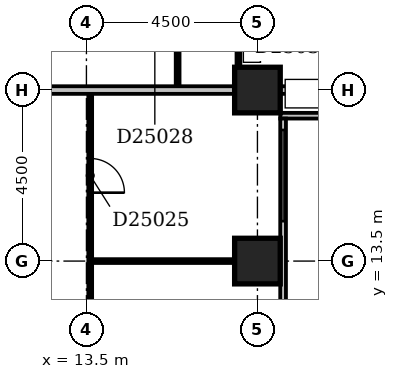
"""IFC4 building model, lengths in metres.
Left out: names, types, materials, properties, quantities, classifications, styles, units other than length and angle.
Written with IfcOpenShell. Run it as: python <this file> out.ifc"""

import sys

from ifc_helpers import new_model, si_unit, direction, frame, frame_2d, origin, origin_2d, place, context, subcontext, project, spatial, rectangle, extrude, element, fill, save


model = new_model("IFC4")
c1 = context("Model", 3, precision=1e-05, world=origin(), true_north=direction((0.0, 1.0)))
c2 = subcontext(c1, "Body", "Model", "MODEL_VIEW")
j1 = project(units=[si_unit("LENGTHUNIT", "METRE"), si_unit("PLANEANGLEUNIT", "RADIAN")], contexts=[c1])
p1 = place(None, origin())
s1 = spatial("IfcSite", under=j1, at=p1, CompositionType="ELEMENT")
p2 = place(p1, origin())
s2 = spatial("IfcBuilding", under=s1, at=p2, CompositionType="ELEMENT")
p3 = place(p2, frame((0.0, 0.0, 101.0)))
s3 = spatial("IfcBuildingStorey", under=s2, at=p3, CompositionType="ELEMENT", Elevation=101.0)
for number, where, z_axis, x_axis in (
    (1, (18.0, 13.5, -0.3), (0.0, 0.0, 1.0), (1.0, 0.0, 0.0)),
    (2, (18.0, 18.0, -0.3), (0.0, 0.0, 1.0), (1.0, 0.0, 0.0)),
):
    element("IfcColumn", number, at=place(p3, frame(where, z_axis=z_axis, x_axis=x_axis)), inside=s3, PredefinedType="COLUMN", context=c2, shape_type="SweptSolid", body=[
        extrude(rectangle(XDim=1.2, YDim=1.2, at=origin_2d()), origin(), (0.0, 0.0, 1.0), 3.6),
    ])
p4 = place(p3, frame((18.675, 8.4, 0.0), z_axis=(0.0, 0.0, 1.0), x_axis=(0.0, 1.0, 0.0)))
e3 = element("IfcWall", 3, at=p4, inside=s3, PredefinedType="STANDARD", context=c2, shape_type="SweptSolid", body=[
    extrude(rectangle(XDim=8.85, YDim=0.15, at=frame_2d((4.425, 0.0))), origin(), (0.0, 0.0, 1.0), 2.7),
])
p5 = place(p4, frame((1.535, 0.0, 0.6)))
e4 = element("IfcOpeningElement", 4, at=p5, cuts=e3, PredefinedType="OPENING", context=c2, shape_type="SweptSolid", body=[
    extrude(rectangle(XDim=1.2, YDim=1.8, at=frame_2d((0.6, 0.9))), frame((0.0, 0.087, 0.0), z_axis=(0.0, -1.0, 0.0), x_axis=(1.0, 0.0, 0.0)), (0.0, 0.0, 1.0), 0.174),
])
p6 = place(p4, frame((6.15, 0.0, 0.6)))
e5 = element("IfcOpeningElement", 5, at=p6, cuts=e3, PredefinedType="OPENING", context=c2, shape_type="SweptSolid", body=[
    extrude(rectangle(XDim=2.4, YDim=1.8, at=frame_2d((1.2, 0.9))), frame((0.0, 0.087, 0.0), z_axis=(0.0, -1.0, 0.0), x_axis=(1.0, 0.0, 0.0)), (0.0, 0.0, 1.0), 0.174),
])
p7 = place(p3, frame((18.6, 17.325, 0.0), z_axis=(0.0, 0.0, 1.0), x_axis=(1.0, 0.0, 0.0)))
e6 = element("IfcWall", 6, at=p7, inside=s3, PredefinedType="STANDARD", context=c2, shape_type="SweptSolid", body=[
    extrude(rectangle(XDim=4.65, YDim=0.15, at=frame_2d((2.325, 0.0))), origin(), (0.0, 0.0, 1.0), 2.7),
])
p8 = place(p3, frame((13.6, 9.6, 0.0), z_axis=(0.0, 0.0, 1.0), x_axis=(0.0, 1.0, 0.0)))
e7 = element("IfcWall", 7, at=p8, inside=s3, PredefinedType="PARTITIONING", context=c2, shape_type="SweptSolid", body=[
    extrude(rectangle(XDim=8.3, YDim=0.1, at=frame_2d((4.15, 0.0))), origin(), (0.0, 0.0, 1.0), 3.3),
])
p9 = place(p8, frame((1.2, 0.0, 0.0)))
e8 = element("IfcOpeningElement", 8, at=p9, cuts=e7, PredefinedType="OPENING", context=c2, shape_type="SweptSolid", body=[
    extrude(rectangle(XDim=0.9, YDim=2.1, at=frame_2d((0.45, 1.05))), frame((0.0, 0.062, 0.0), z_axis=(0.0, -1.0, 0.0), x_axis=(1.0, 0.0, 0.0)), (0.0, 0.0, 1.0), 0.124),
])
p10 = place(p8, frame((5.7, 0.0, 0.0)))
e9 = element("IfcOpeningElement", 9, at=p10, cuts=e7, PredefinedType="OPENING", context=c2, shape_type="SweptSolid", body=[
    extrude(rectangle(XDim=0.9, YDim=2.1, at=frame_2d((0.45, 1.05))), frame((0.0, 0.062, 0.0), z_axis=(0.0, -1.0, 0.0), x_axis=(1.0, 0.0, 0.0)), (0.0, 0.0, 1.0), 0.124),
])
p11 = place(p3, frame((13.65, 13.5, 0.0), z_axis=(0.0, 0.0, 1.0), x_axis=(1.0, 0.0, 0.0)))
e10 = element("IfcWall", 10, at=p11, inside=s3, PredefinedType="PARTITIONING", context=c2, shape_type="SweptSolid", body=[
    extrude(rectangle(XDim=3.75, YDim=0.1, at=frame_2d((1.875, 0.0))), origin(), (0.0, 0.0, 1.0), 3.3),
])
p12 = place(p3, frame((9.1, 18.0, 0.0), z_axis=(0.0, 0.0, 1.0), x_axis=(1.0, 0.0, 0.0)))
e11 = element("IfcWall", 11, at=p12, inside=s3, PredefinedType="PARTITIONING", context=c2, shape_type="SweptSolid", body=[
    extrude(rectangle(XDim=8.3, YDim=0.2, at=frame_2d((4.15, 0.0))), origin(), (0.0, 0.0, 1.0), 2.6),
])
p13 = place(p3, frame((18.6, 18.0, 0.0), z_axis=(0.0, 0.0, 1.0), x_axis=(1.0, 0.0, 0.0)))
e12 = element("IfcWall", 12, at=p13, inside=s3, PredefinedType="PARTITIONING", context=c2, shape_type="SweptSolid", body=[
    extrude(rectangle(XDim=3.3, YDim=0.2, at=frame_2d((1.65, 0.0))), origin(), (0.0, 0.0, 1.0), 2.7),
])
p14 = place(p3, frame((15.9, 18.1, 0.0), z_axis=(0.0, 0.0, 1.0), x_axis=(0.0, 1.0, 0.0)))
e13 = element("IfcWall", 13, at=p14, inside=s3, PredefinedType="PARTITIONING", context=c2, shape_type="SweptSolid", body=[
    extrude(rectangle(XDim=5.0, YDim=0.1, at=frame_2d((2.5, 0.0))), origin(), (0.0, 0.0, 1.0), 3.3),
])
p15 = place(p14, frame((2.0, 0.0, 0.0)))
e14 = element("IfcOpeningElement", 14, at=p15, cuts=e13, PredefinedType="OPENING", context=c2, shape_type="SweptSolid", body=[
    extrude(rectangle(XDim=0.9, YDim=2.1, at=frame_2d((0.45, 1.05))), frame((0.0, 0.062, 0.0), z_axis=(0.0, -1.0, 0.0), x_axis=(1.0, 0.0, 0.0)), (0.0, 0.0, 1.0), 0.124),
])
p16 = place(p3, frame((17.5, 18.1, 0.0), z_axis=(0.0, 0.0, 1.0), x_axis=(0.0, 1.0, 0.0)))
e15 = element("IfcWall", 15, at=p16, inside=s3, PredefinedType="PARTITIONING", context=c2, shape_type="SweptSolid", body=[
    extrude(rectangle(XDim=17.8, YDim=0.1, at=frame_2d((8.9, 0.0))), origin(), (0.0, 0.0, 1.0), 3.3),
])
p17 = place(p16, frame((2.85, 0.0, 0.0)))
e16 = element("IfcOpeningElement", 16, at=p17, cuts=e15, PredefinedType="OPENING", context=c2, shape_type="SweptSolid", body=[
    extrude(rectangle(XDim=0.9, YDim=2.1, at=frame_2d((0.45, 1.05))), frame((0.0, 0.062, 0.0), z_axis=(0.0, -1.0, 0.0), x_axis=(1.0, 0.0, 0.0)), (0.0, 0.0, 1.0), 0.124),
])
p18 = place(p16, frame((8.4, 0.0, 0.0)))
e17 = element("IfcOpeningElement", 17, at=p18, cuts=e15, PredefinedType="OPENING", context=c2, shape_type="SweptSolid", body=[
    extrude(rectangle(XDim=0.9, YDim=2.1, at=frame_2d((0.45, 1.05))), frame((0.0, 0.062, 0.0), z_axis=(0.0, -1.0, 0.0), x_axis=(1.0, 0.0, 0.0)), (0.0, 0.0, 1.0), 0.124),
])
p19 = place(p16, frame((14.05, 0.0, 0.0)))
e18 = element("IfcOpeningElement", 18, at=p19, cuts=e15, PredefinedType="OPENING", context=c2, shape_type="SweptSolid", body=[
    extrude(rectangle(XDim=0.9, YDim=2.1, at=frame_2d((0.45, 1.05))), frame((0.0, 0.062, 0.0), z_axis=(0.0, -1.0, 0.0), x_axis=(1.0, 0.0, 0.0)), (0.0, 0.0, 1.0), 0.124),
])
p20 = place(p6, origin())
e19 = element("IfcWindow", 19, at=p20, inside=s3, PartitioningType="SINGLE_PANEL", PredefinedType="WINDOW", context=c2, shape_type="SweptSolid", body=[
    extrude(rectangle(XDim=2.4, YDim=1.8, at=frame_2d((1.2, 0.9))), frame((0.0, 0.03, 0.0), z_axis=(0.0, -1.0, 0.0), x_axis=(1.0, 0.0, 0.0)), (0.0, 0.0, 1.0), 0.06),
])
fill(e5, e19)
p21 = place(p10, frame((0.9, 0.0, 0.0), z_axis=(0.0, 0.0, 1.0), x_axis=(-1.0, 0.0, 0.0)))
e20 = element("IfcDoor", 20, at=p21, inside=s3, OperationType="SINGLE_SWING_RIGHT", PredefinedType="DOOR", context=c2, shape_type="SweptSolid", body=[
    extrude(rectangle(XDim=0.9, YDim=2.1, at=frame_2d((0.45, 1.05))), frame((0.0, 0.025, 0.0), z_axis=(0.0, -1.0, 0.0), x_axis=(1.0, 0.0, 0.0)), (0.0, 0.0, 1.0), 0.05),
])
fill(e9, e20)
save(model, sys.argv[1])
